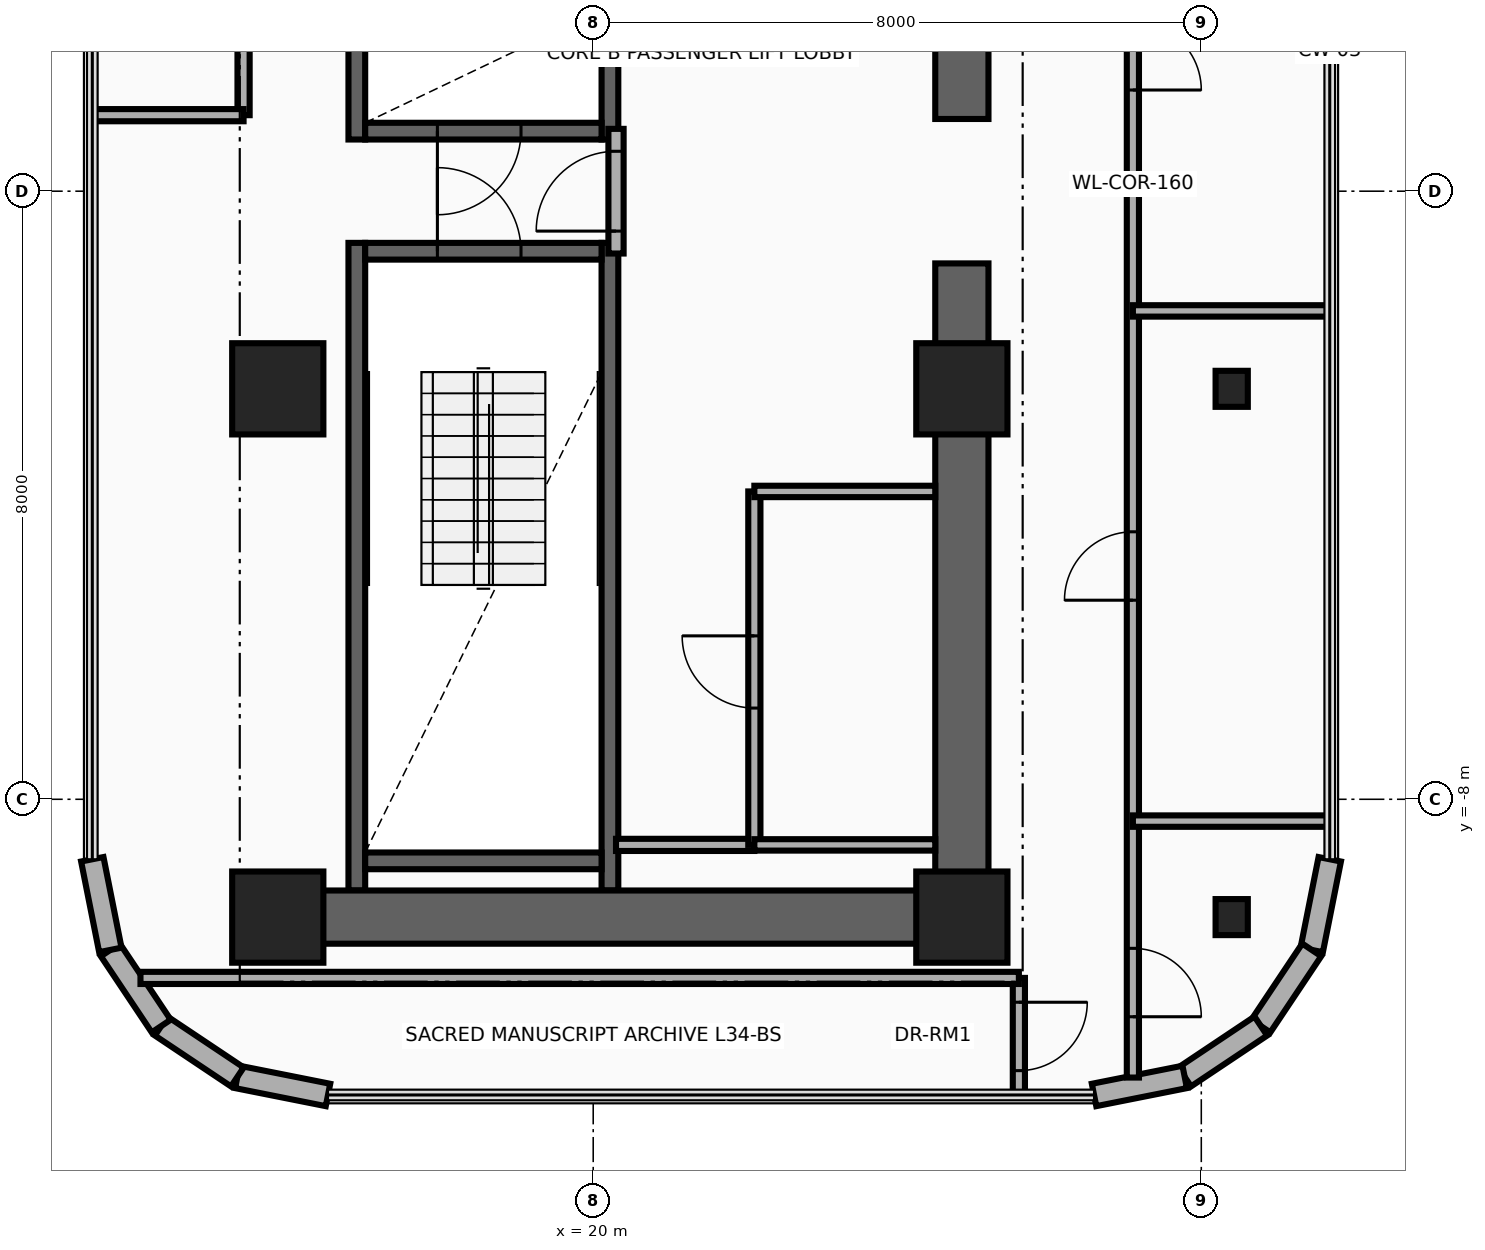
"""IFC4 building model, lengths in metres.
Left out: names, types, materials, properties, quantities, classifications, styles, units other than length and angle.
Written with IfcOpenShell. Run it as: python <this file> out.ifc"""

import sys

from ifc_helpers import new_model, si_unit, direction, frame, frame_2d, origin, origin_2d, place, context, subcontext, project, spatial, rectangle, i_section, extrude, source, transform, mapped, element, fill, save


model = new_model("IFC4")
c1 = context("Model", 3, precision=1e-05, world=origin(), true_north=direction((0.0, 1.0)))
c2 = subcontext(c1, "Body", "Model", "MODEL_VIEW")
j1 = project(units=[si_unit("LENGTHUNIT", "METRE"), si_unit("PLANEANGLEUNIT", "RADIAN")], contexts=[c1])
p1 = place(None, origin())
s1 = spatial("IfcSite", under=j1, at=p1, CompositionType="ELEMENT")
p2 = place(p1, origin())
s2 = spatial("IfcBuilding", under=s1, at=p2, CompositionType="ELEMENT")
p3 = place(p2, frame((0.0, 0.0, 135.3)))
s3 = spatial("IfcBuildingStorey", under=s2, at=p3, CompositionType="ELEMENT", Elevation=135.3)
for number, where, z_axis, x_axis in (
    (1, (16.89, 0.68, 0.0), (0.0, 0.0, 1.0), (0.0, 1.0, 0.0)),
    (2, (20.22, 0.68, 0.0), (0.0, 0.0, 1.0), (0.0, 1.0, 0.0)),
):
    element("IfcWall", number, at=place(p3, frame(where, z_axis=z_axis, x_axis=x_axis)), inside=s3, PredefinedType="SHEAR", context=c2, shape_type="SweptSolid", body=[
        extrude(rectangle(XDim=8.52, YDim=0.22, at=frame_2d((4.26, 0.0))), origin(), (0.0, 0.0, 1.0), 3.46),
    ])
p4 = place(p3, frame((17.0, 0.79, 0.0), z_axis=(0.0, 0.0, 1.0), x_axis=(1.0, 0.0, 0.0)))
e3 = element("IfcWall", 3, at=p4, inside=s3, PredefinedType="SHEAR", context=c2, shape_type="SweptSolid", body=[
    extrude(rectangle(XDim=3.11, YDim=0.22, at=frame_2d((1.555, 0.0))), origin(), (0.0, 0.0, 1.0), 3.46),
])
p5 = place(p4, frame((0.95, 0.0, 0.0)))
e4 = element("IfcOpeningElement", 4, at=p5, cuts=e3, PredefinedType="OPENING", context=c2, shape_type="SweptSolid", body=[
    extrude(rectangle(XDim=1.1, YDim=2.15, at=frame_2d((0.55, 1.075))), frame((0.0, 0.125, 0.0), z_axis=(0.0, -1.0, 0.0), x_axis=(1.0, 0.0, 0.0)), (0.0, 0.0, 1.0), 0.25),
])
for number, where, z_axis, x_axis in (
    (5, (16.89, -9.2, 0.0), (0.0, 0.0, 1.0), (0.0, 1.0, 0.0)),
    (6, (20.22, -9.2, 0.0), (0.0, 0.0, 1.0), (0.0, 1.0, 0.0)),
):
    element("IfcWall", number, at=place(p3, frame(where, z_axis=z_axis, x_axis=x_axis)), inside=s3, PredefinedType="SHEAR", context=c2, shape_type="SweptSolid", body=[
        extrude(rectangle(XDim=8.52, YDim=0.22, at=frame_2d((4.26, 0.0))), origin(), (0.0, 0.0, 1.0), 3.46),
    ])
p6 = place(p3, frame((17.0, -8.81, 0.0), z_axis=(0.0, 0.0, 1.0), x_axis=(1.0, 0.0, 0.0)))
e7 = element("IfcWall", 7, at=p6, inside=s3, PredefinedType="SHEAR", context=c2, shape_type="SweptSolid", body=[
    extrude(rectangle(XDim=3.11, YDim=0.22, at=frame_2d((1.555, 0.0))), origin(), (0.0, 0.0, 1.0), 3.46),
])
p7 = place(p3, frame((17.0, -0.79, 0.0), z_axis=(0.0, 0.0, 1.0), x_axis=(1.0, 0.0, 0.0)))
e8 = element("IfcWall", 8, at=p7, inside=s3, PredefinedType="SHEAR", context=c2, shape_type="SweptSolid", body=[
    extrude(rectangle(XDim=3.11, YDim=0.22, at=frame_2d((1.555, 0.0))), origin(), (0.0, 0.0, 1.0), 3.46),
])
p8 = place(p7, frame((0.95, 0.0, 0.0)))
e9 = element("IfcOpeningElement", 9, at=p8, cuts=e8, PredefinedType="OPENING", context=c2, shape_type="SweptSolid", body=[
    extrude(rectangle(XDim=1.1, YDim=2.15, at=frame_2d((0.55, 1.075))), frame((0.0, 0.125, 0.0), z_axis=(0.0, -1.0, 0.0), x_axis=(1.0, 0.0, 0.0)), (0.0, 0.0, 1.0), 0.25),
])
for number, where, z_axis, x_axis in (
    (10, (24.85, -9.9, 0.0), (0.0, 0.0, 1.0), (0.0, 1.0, 0.0)),
    (11, (24.85, 0.95, 0.0), (0.0, 0.0, 1.0), (0.0, 1.0, 0.0)),
):
    element("IfcWall", number, at=place(p3, frame(where, z_axis=z_axis, x_axis=x_axis)), inside=s3, PredefinedType="SHEAR", context=c2, shape_type="SweptSolid", body=[
        extrude(rectangle(XDim=8.95, YDim=0.7, at=frame_2d((4.475, 0.0))), origin(), (0.0, 0.0, 1.0), 3.46),
    ])
p9 = place(p3, frame((15.85, -9.55, 0.0), z_axis=(0.0, 0.0, 1.0), x_axis=(1.0, 0.0, 0.0)))
e12 = element("IfcWall", 12, at=p9, inside=s3, PredefinedType="SHEAR", context=c2, shape_type="SweptSolid", body=[
    extrude(rectangle(XDim=9.0, YDim=0.7, at=frame_2d((4.5, 0.0))), origin(), (0.0, 0.0, 1.0), 3.46),
])
m1 = source(origin(), c2, "Body", "SweptSolid", [
    extrude(rectangle(XDim=1.2, YDim=1.2, at=origin_2d()), origin(), (0.0, 0.0, 1.0), 3.7),
])
for number, where, z_axis, x_axis in (
    (13, (15.85, -9.55, 0.0), (0.0, 0.0, 1.0), (1.0, 0.0, 0.0)),
    (14, (24.85, -9.55, 0.0), (0.0, 0.0, 1.0), (1.0, 0.0, 0.0)),
):
    element("IfcColumn", number, at=place(p3, frame(where, z_axis=z_axis, x_axis=x_axis)), inside=s3, PredefinedType="COLUMN", context=c2, shape_type="MappedRepresentation", body=[
        mapped(m1, transform((0.0, 0.0, 0.0), x_axis=(1.0, 0.0, 0.0), y_axis=(0.0, 1.0, 0.0), z_axis=(0.0, 0.0, 1.0), scale=1.0)),
    ])
m2 = source(origin(), c2, "Body", "SweptSolid", [
    extrude(i_section(OverallWidth=0.424, OverallDepth=0.474, WebThickness=0.048, FlangeThickness=0.077, at=origin_2d()), origin(), (0.0, 0.0, 1.0), 3.7),
])
p10 = place(p3, frame((28.4, -9.55, 0.0), z_axis=(0.0, 0.0, 1.0), x_axis=(1.0, 0.0, 0.0)))
e15 = element("IfcColumn", 15, at=p10, inside=s3, PredefinedType="COLUMN", context=c2, shape_type="MappedRepresentation", body=[
    mapped(m2, transform((0.0, 0.0, 0.0), x_axis=(1.0, 0.0, 0.0), y_axis=(0.0, 1.0, 0.0), z_axis=(0.0, 0.0, 1.0), scale=1.0)),
])
for number, where, z_axis, x_axis in (
    (16, (15.85, -2.6, 0.0), (0.0, 0.0, 1.0), (1.0, 0.0, 0.0)),
    (17, (24.85, -2.6, 0.0), (0.0, 0.0, 1.0), (1.0, 0.0, 0.0)),
):
    element("IfcColumn", number, at=place(p3, frame(where, z_axis=z_axis, x_axis=x_axis)), inside=s3, PredefinedType="COLUMN", context=c2, shape_type="MappedRepresentation", body=[
        mapped(m1, transform((0.0, 0.0, 0.0), x_axis=(1.0, 0.0, 0.0), y_axis=(0.0, 1.0, 0.0), z_axis=(0.0, 0.0, 1.0), scale=1.0)),
    ])
p11 = place(p3, frame((28.4, -2.6, 0.0), z_axis=(0.0, 0.0, 1.0), x_axis=(1.0, 0.0, 0.0)))
e18 = element("IfcColumn", 18, at=p11, inside=s3, PredefinedType="COLUMN", context=c2, shape_type="MappedRepresentation", body=[
    mapped(m2, transform((0.0, 0.0, 0.0), x_axis=(1.0, 0.0, 0.0), y_axis=(0.0, 1.0, 0.0), z_axis=(0.0, 0.0, 1.0), scale=1.0)),
])
p12 = place(p3, frame((29.69, -8.789, 0.0), z_axis=(0.0, 0.0, 1.0), x_axis=(-0.194996050505, -0.980804027463, 0.0)))
e19 = element("IfcWall", 19, at=p12, inside=s3, PredefinedType="SOLIDWALL", context=c2, shape_type="SweptSolid", body=[
    extrude(rectangle(XDim=1.216, YDim=0.3, at=frame_2d((0.608, 0.0))), origin(), (0.0, 0.0, 1.0), 3.46),
])
for number, where, z_axis, x_axis in (
    (20, (29.453, -9.982, 0.0), (0.0, 0.0, 1.0), (-0.556, -0.831, 0.0)),
    (21, (28.783, -10.983, 0.0), (0.0, 0.0, 1.0), (-0.831, -0.556, 0.0)),
):
    element("IfcWall", number, at=place(p3, frame(where, z_axis=z_axis, x_axis=x_axis)), inside=s3, PredefinedType="SOLIDWALL", context=c2, shape_type="SweptSolid", body=[
        extrude(rectangle(XDim=1.205, YDim=0.3, at=frame_2d((0.603, 0.0))), origin(), (0.0, 0.0, 1.0), 3.46),
    ])
p13 = place(p3, frame((27.782, -11.653, 0.0), z_axis=(0.0, 0.0, 1.0), x_axis=(-0.980811661072, -0.194957650543, 0.0)))
e22 = element("IfcWall", 22, at=p13, inside=s3, PredefinedType="SOLIDWALL", context=c2, shape_type="SweptSolid", body=[
    extrude(rectangle(XDim=1.216, YDim=0.3, at=frame_2d((0.608, 0.0))), origin(), (0.0, 0.0, 1.0), 3.46),
])
p14 = place(p3, frame((16.511, -11.89, 0.0), z_axis=(0.0, 0.0, 1.0), x_axis=(-0.980804027463, 0.194996050505, 0.0)))
e23 = element("IfcWall", 23, at=p14, inside=s3, PredefinedType="SOLIDWALL", context=c2, shape_type="SweptSolid", body=[
    extrude(rectangle(XDim=1.216, YDim=0.3, at=frame_2d((0.608, 0.0))), origin(), (0.0, 0.0, 1.0), 3.46),
])
for number, where, z_axis, x_axis in (
    (24, (15.318, -11.653, 0.0), (0.0, 0.0, 1.0), (-0.831, 0.556, 0.0)),
    (25, (14.317, -10.983, 0.0), (0.0, 0.0, 1.0), (-0.556, 0.831, 0.0)),
):
    element("IfcWall", number, at=place(p3, frame(where, z_axis=z_axis, x_axis=x_axis)), inside=s3, PredefinedType="SOLIDWALL", context=c2, shape_type="SweptSolid", body=[
        extrude(rectangle(XDim=1.205, YDim=0.3, at=frame_2d((0.603, 0.0))), origin(), (0.0, 0.0, 1.0), 3.46),
    ])
p15 = place(p3, frame((13.647, -9.982, 0.0), z_axis=(0.0, 0.0, 1.0), x_axis=(-0.195189223115, 0.980765602568, 0.0)))
e26 = element("IfcWall", 26, at=p15, inside=s3, PredefinedType="SOLIDWALL", context=c2, shape_type="SweptSolid", body=[
    extrude(rectangle(XDim=1.216, YDim=0.3, at=frame_2d((0.608, 0.0))), origin(), (0.0, 0.0, 1.0), 3.46),
])
p16 = place(p3, frame((20.3, -0.82, 0.0), z_axis=(0.0, 0.0, 1.0), x_axis=(0.0, 1.0, 0.0)))
e27 = element("IfcWall", 27, at=p16, inside=s3, PredefinedType="PARTITIONING", context=c2, shape_type="SweptSolid", body=[
    extrude(rectangle(XDim=1.64, YDim=0.2, at=frame_2d((0.82, 0.0))), origin(), (0.0, 0.0, 1.0), 3.46),
])
p17 = place(p16, frame((0.295, 0.0, 0.0)))
e28 = element("IfcOpeningElement", 28, at=p17, cuts=e27, PredefinedType="OPENING", context=c2, shape_type="SweptSolid", body=[
    extrude(rectangle(XDim=1.05, YDim=2.15, at=frame_2d((0.525, 1.075))), frame((0.0, 0.115, 0.0), z_axis=(0.0, -1.0, 0.0), x_axis=(1.0, 0.0, 0.0)), (0.0, 0.0, 1.0), 0.23),
])
p18 = place(p3, frame((20.3, -8.6, 0.0), z_axis=(0.0, 0.0, 1.0), x_axis=(1.0, 0.0, 0.0)))
e29 = element("IfcWall", 29, at=p18, inside=s3, PredefinedType="PARTITIONING", context=c2, shape_type="SweptSolid", body=[
    extrude(rectangle(XDim=1.82, YDim=0.16, at=frame_2d((0.91, 0.0))), origin(), (0.0, 0.0, 1.0), 3.46),
])
p19 = place(p3, frame((22.12, -8.6, 0.0), z_axis=(0.0, 0.0, 1.0), x_axis=(0.0, 1.0, 0.0)))
e30 = element("IfcWall", 30, at=p19, inside=s3, PredefinedType="PARTITIONING", context=c2, shape_type="SweptSolid", body=[
    extrude(rectangle(XDim=4.65, YDim=0.16, at=frame_2d((2.325, 0.0))), origin(), (0.0, 0.0, 1.0), 3.46),
])
p20 = place(p19, frame((1.8, 0.0, 0.0)))
e31 = element("IfcOpeningElement", 31, at=p20, cuts=e30, PredefinedType="OPENING", context=c2, shape_type="SweptSolid", body=[
    extrude(rectangle(XDim=0.95, YDim=2.15, at=frame_2d((0.475, 1.075))), frame((0.0, 0.095, 0.0), z_axis=(0.0, -1.0, 0.0), x_axis=(1.0, 0.0, 0.0)), (0.0, 0.0, 1.0), 0.19),
])
for number, where, z_axis, x_axis in (
    (32, (22.12, -3.95, 0.0), (0.0, 0.0, 1.0), (1.0, 0.0, 0.0)),
    (33, (22.12, -8.6, 0.0), (0.0, 0.0, 1.0), (1.0, 0.0, 0.0)),
):
    element("IfcWall", number, at=place(p3, frame(where, z_axis=z_axis, x_axis=x_axis)), inside=s3, PredefinedType="PARTITIONING", context=c2, shape_type="SweptSolid", body=[
        extrude(rectangle(XDim=2.38, YDim=0.15, at=frame_2d((1.19, 0.0))), origin(), (0.0, 0.0, 1.0), 3.46),
    ])
p21 = place(p3, frame((25.6, -11.89, 0.0), z_axis=(0.0, 0.0, 1.0), x_axis=(0.0, 1.0, 0.0)))
e34 = element("IfcWall", 34, at=p21, inside=s3, PredefinedType="PARTITIONING", context=c2, shape_type="SweptSolid", body=[
    extrude(rectangle(XDim=1.54, YDim=0.16, at=frame_2d((0.77, 0.0))), origin(), (0.0, 0.0, 1.0), 3.46),
])
p22 = place(p21, frame((0.32, 0.0, 0.0)))
e35 = element("IfcOpeningElement", 35, at=p22, cuts=e34, PredefinedType="OPENING", context=c2, shape_type="SweptSolid", body=[
    extrude(rectangle(XDim=0.9, YDim=2.1, at=frame_2d((0.45, 1.05))), frame((0.0, 0.095, 0.0), z_axis=(0.0, -1.0, 0.0), x_axis=(1.0, 0.0, 0.0)), (0.0, 0.0, 1.0), 0.19),
])
p23 = place(p3, frame((14.044, -10.35, 0.0), z_axis=(0.0, 0.0, 1.0), x_axis=(1.0, 0.0, 0.0)))
e36 = element("IfcWall", 36, at=p23, inside=s3, PredefinedType="PARTITIONING", context=c2, shape_type="SweptSolid", body=[
    extrude(rectangle(XDim=11.556, YDim=0.16, at=frame_2d((5.778, 0.0))), origin(), (0.0, 0.0, 1.0), 3.46),
])
p24 = place(p3, frame((27.1, -11.661, 0.0), z_axis=(0.0, 0.0, 1.0), x_axis=(0.0, 1.0, 0.0)))
e37 = element("IfcWall", 37, at=p24, inside=s3, PredefinedType="PARTITIONING", context=c2, shape_type="SweptSolid", body=[
    extrude(rectangle(XDim=23.511, YDim=0.16, at=frame_2d((11.755, 0.0))), origin(), (0.0, 0.0, 1.0), 2.666),
])
p25 = place(p24, frame((0.8, 0.0, 0.0)))
e38 = element("IfcOpeningElement", 38, at=p25, cuts=e37, PredefinedType="OPENING", context=c2, shape_type="SweptSolid", body=[
    extrude(rectangle(XDim=0.9, YDim=2.1, at=frame_2d((0.45, 1.05))), frame((0.0, 0.095, 0.0), z_axis=(0.0, -1.0, 0.0), x_axis=(1.0, 0.0, 0.0)), (0.0, 0.0, 1.0), 0.19),
])
p26 = place(p24, frame((6.28, 0.0, 0.0)))
e39 = element("IfcOpeningElement", 39, at=p26, cuts=e37, PredefinedType="OPENING", context=c2, shape_type="SweptSolid", body=[
    extrude(rectangle(XDim=0.9, YDim=2.1, at=frame_2d((0.45, 1.05))), frame((0.0, 0.095, 0.0), z_axis=(0.0, -1.0, 0.0), x_axis=(1.0, 0.0, 0.0)), (0.0, 0.0, 1.0), 0.19),
])
p27 = place(p24, frame((12.992, 0.0, 0.0)))
e40 = element("IfcOpeningElement", 40, at=p27, cuts=e37, PredefinedType="OPENING", context=c2, shape_type="SweptSolid", body=[
    extrude(rectangle(XDim=0.9, YDim=2.1, at=frame_2d((0.45, 1.05))), frame((0.0, 0.095, 0.0), z_axis=(0.0, -1.0, 0.0), x_axis=(1.0, 0.0, 0.0)), (0.0, 0.0, 1.0), 0.19),
])
p28 = place(p24, frame((19.705, 0.0, 0.0)))
e41 = element("IfcOpeningElement", 41, at=p28, cuts=e37, PredefinedType="OPENING", context=c2, shape_type="SweptSolid", body=[
    extrude(rectangle(XDim=0.9, YDim=2.1, at=frame_2d((0.45, 1.05))), frame((0.0, 0.095, 0.0), z_axis=(0.0, -1.0, 0.0), x_axis=(1.0, 0.0, 0.0)), (0.0, 0.0, 1.0), 0.19),
])
for number, where, z_axis, x_axis in (
    (42, (27.1, -8.287, 0.0), (0.0, 0.0, 1.0), (1.0, 0.0, 0.0)),
    (43, (27.1, -1.575, 0.0), (0.0, 0.0, 1.0), (1.0, 0.0, 0.0)),
):
    element("IfcWall", number, at=place(p3, frame(where, z_axis=z_axis, x_axis=x_axis)), inside=s3, PredefinedType="PARTITIONING", context=c2, shape_type="SweptSolid", body=[
        extrude(rectangle(XDim=2.59, YDim=0.15, at=frame_2d((1.295, 0.0))), origin(), (0.0, 0.0, 1.0), 2.896),
    ])
p29 = place(p3, frame((15.4, 1.0, 0.0), z_axis=(0.0, 0.0, 1.0), x_axis=(0.0, 1.0, 0.0)))
e44 = element("IfcWall", 44, at=p29, inside=s3, PredefinedType="PARTITIONING", context=c2, shape_type="SweptSolid", body=[
    extrude(rectangle(XDim=9.35, YDim=0.16, at=frame_2d((4.675, 0.0))), origin(), (0.0, 0.0, 1.0), 2.245),
])
p30 = place(p3, frame((13.41, 1.0, 0.0), z_axis=(0.0, 0.0, 1.0), x_axis=(1.0, 0.0, 0.0)))
e45 = element("IfcWall", 45, at=p30, inside=s3, PredefinedType="PARTITIONING", context=c2, shape_type="SweptSolid", body=[
    extrude(rectangle(XDim=1.99, YDim=0.16, at=frame_2d((0.995, 0.0))), origin(), (0.0, 0.0, 1.0), 2.245),
])
p31 = place(p17, origin())
e46 = element("IfcDoor", 46, at=p31, inside=s3, OperationType="SINGLE_SWING_RIGHT", PredefinedType="DOOR", context=c2, shape_type="SweptSolid", body=[
    extrude(rectangle(XDim=1.05, YDim=2.15, at=frame_2d((0.525, 1.075))), frame((0.0, 0.025, 0.0), z_axis=(0.0, -1.0, 0.0), x_axis=(1.0, 0.0, 0.0)), (0.0, 0.0, 1.0), 0.05),
])
fill(e28, e46)
p32 = place(p5, frame((1.1, 0.0, 0.0), z_axis=(0.0, 0.0, 1.0), x_axis=(-1.0, 0.0, 0.0)))
e47 = element("IfcDoor", 47, at=p32, inside=s3, OperationType="SINGLE_SWING_LEFT", PredefinedType="DOOR", context=c2, shape_type="SweptSolid", body=[
    extrude(rectangle(XDim=1.1, YDim=2.15, at=frame_2d((0.55, 1.075))), frame((0.0, 0.025, 0.0), z_axis=(0.0, -1.0, 0.0), x_axis=(1.0, 0.0, 0.0)), (0.0, 0.0, 1.0), 0.05),
])
fill(e4, e47)
p33 = place(p8, origin())
e48 = element("IfcDoor", 48, at=p33, inside=s3, OperationType="SINGLE_SWING_RIGHT", PredefinedType="DOOR", context=c2, shape_type="SweptSolid", body=[
    extrude(rectangle(XDim=1.1, YDim=2.15, at=frame_2d((0.55, 1.075))), frame((0.0, 0.025, 0.0), z_axis=(0.0, -1.0, 0.0), x_axis=(1.0, 0.0, 0.0)), (0.0, 0.0, 1.0), 0.05),
])
fill(e9, e48)
p34 = place(p20, origin())
e49 = element("IfcDoor", 49, at=p34, inside=s3, OperationType="SINGLE_SWING_RIGHT", PredefinedType="DOOR", context=c2, shape_type="SweptSolid", body=[
    extrude(rectangle(XDim=0.95, YDim=2.15, at=frame_2d((0.475, 1.075))), frame((0.0, 0.025, 0.0), z_axis=(0.0, -1.0, 0.0), x_axis=(1.0, 0.0, 0.0)), (0.0, 0.0, 1.0), 0.05),
])
fill(e31, e49)
p35 = place(p22, frame((0.9, 0.0, 0.0), z_axis=(0.0, 0.0, 1.0), x_axis=(-1.0, 0.0, 0.0)))
e50 = element("IfcDoor", 50, at=p35, inside=s3, OperationType="SINGLE_SWING_LEFT", PredefinedType="DOOR", context=c2, shape_type="SweptSolid", body=[
    extrude(rectangle(XDim=0.9, YDim=2.1, at=frame_2d((0.45, 1.05))), frame((0.0, 0.025, 0.0), z_axis=(0.0, -1.0, 0.0), x_axis=(1.0, 0.0, 0.0)), (0.0, 0.0, 1.0), 0.05),
])
fill(e35, e50)
p36 = place(p25, frame((0.9, 0.0, 0.0), z_axis=(0.0, 0.0, 1.0), x_axis=(-1.0, 0.0, 0.0)))
e51 = element("IfcDoor", 51, at=p36, inside=s3, OperationType="SINGLE_SWING_LEFT", PredefinedType="DOOR", context=c2, shape_type="SweptSolid", body=[
    extrude(rectangle(XDim=0.9, YDim=2.1, at=frame_2d((0.45, 1.05))), frame((0.0, 0.025, 0.0), z_axis=(0.0, -1.0, 0.0), x_axis=(1.0, 0.0, 0.0)), (0.0, 0.0, 1.0), 0.05),
])
fill(e38, e51)
p37 = place(p26, origin())
e52 = element("IfcDoor", 52, at=p37, inside=s3, OperationType="SINGLE_SWING_RIGHT", PredefinedType="DOOR", context=c2, shape_type="SweptSolid", body=[
    extrude(rectangle(XDim=0.9, YDim=2.1, at=frame_2d((0.45, 1.05))), frame((0.0, 0.025, 0.0), z_axis=(0.0, -1.0, 0.0), x_axis=(1.0, 0.0, 0.0)), (0.0, 0.0, 1.0), 0.05),
])
fill(e39, e52)
p38 = place(p27, frame((0.9, 0.0, 0.0), z_axis=(0.0, 0.0, 1.0), x_axis=(-1.0, 0.0, 0.0)))
e53 = element("IfcDoor", 53, at=p38, inside=s3, OperationType="SINGLE_SWING_LEFT", PredefinedType="DOOR", context=c2, shape_type="SweptSolid", body=[
    extrude(rectangle(XDim=0.9, YDim=2.1, at=frame_2d((0.45, 1.05))), frame((0.0, 0.025, 0.0), z_axis=(0.0, -1.0, 0.0), x_axis=(1.0, 0.0, 0.0)), (0.0, 0.0, 1.0), 0.05),
])
fill(e40, e53)
save(model, sys.argv[1])
